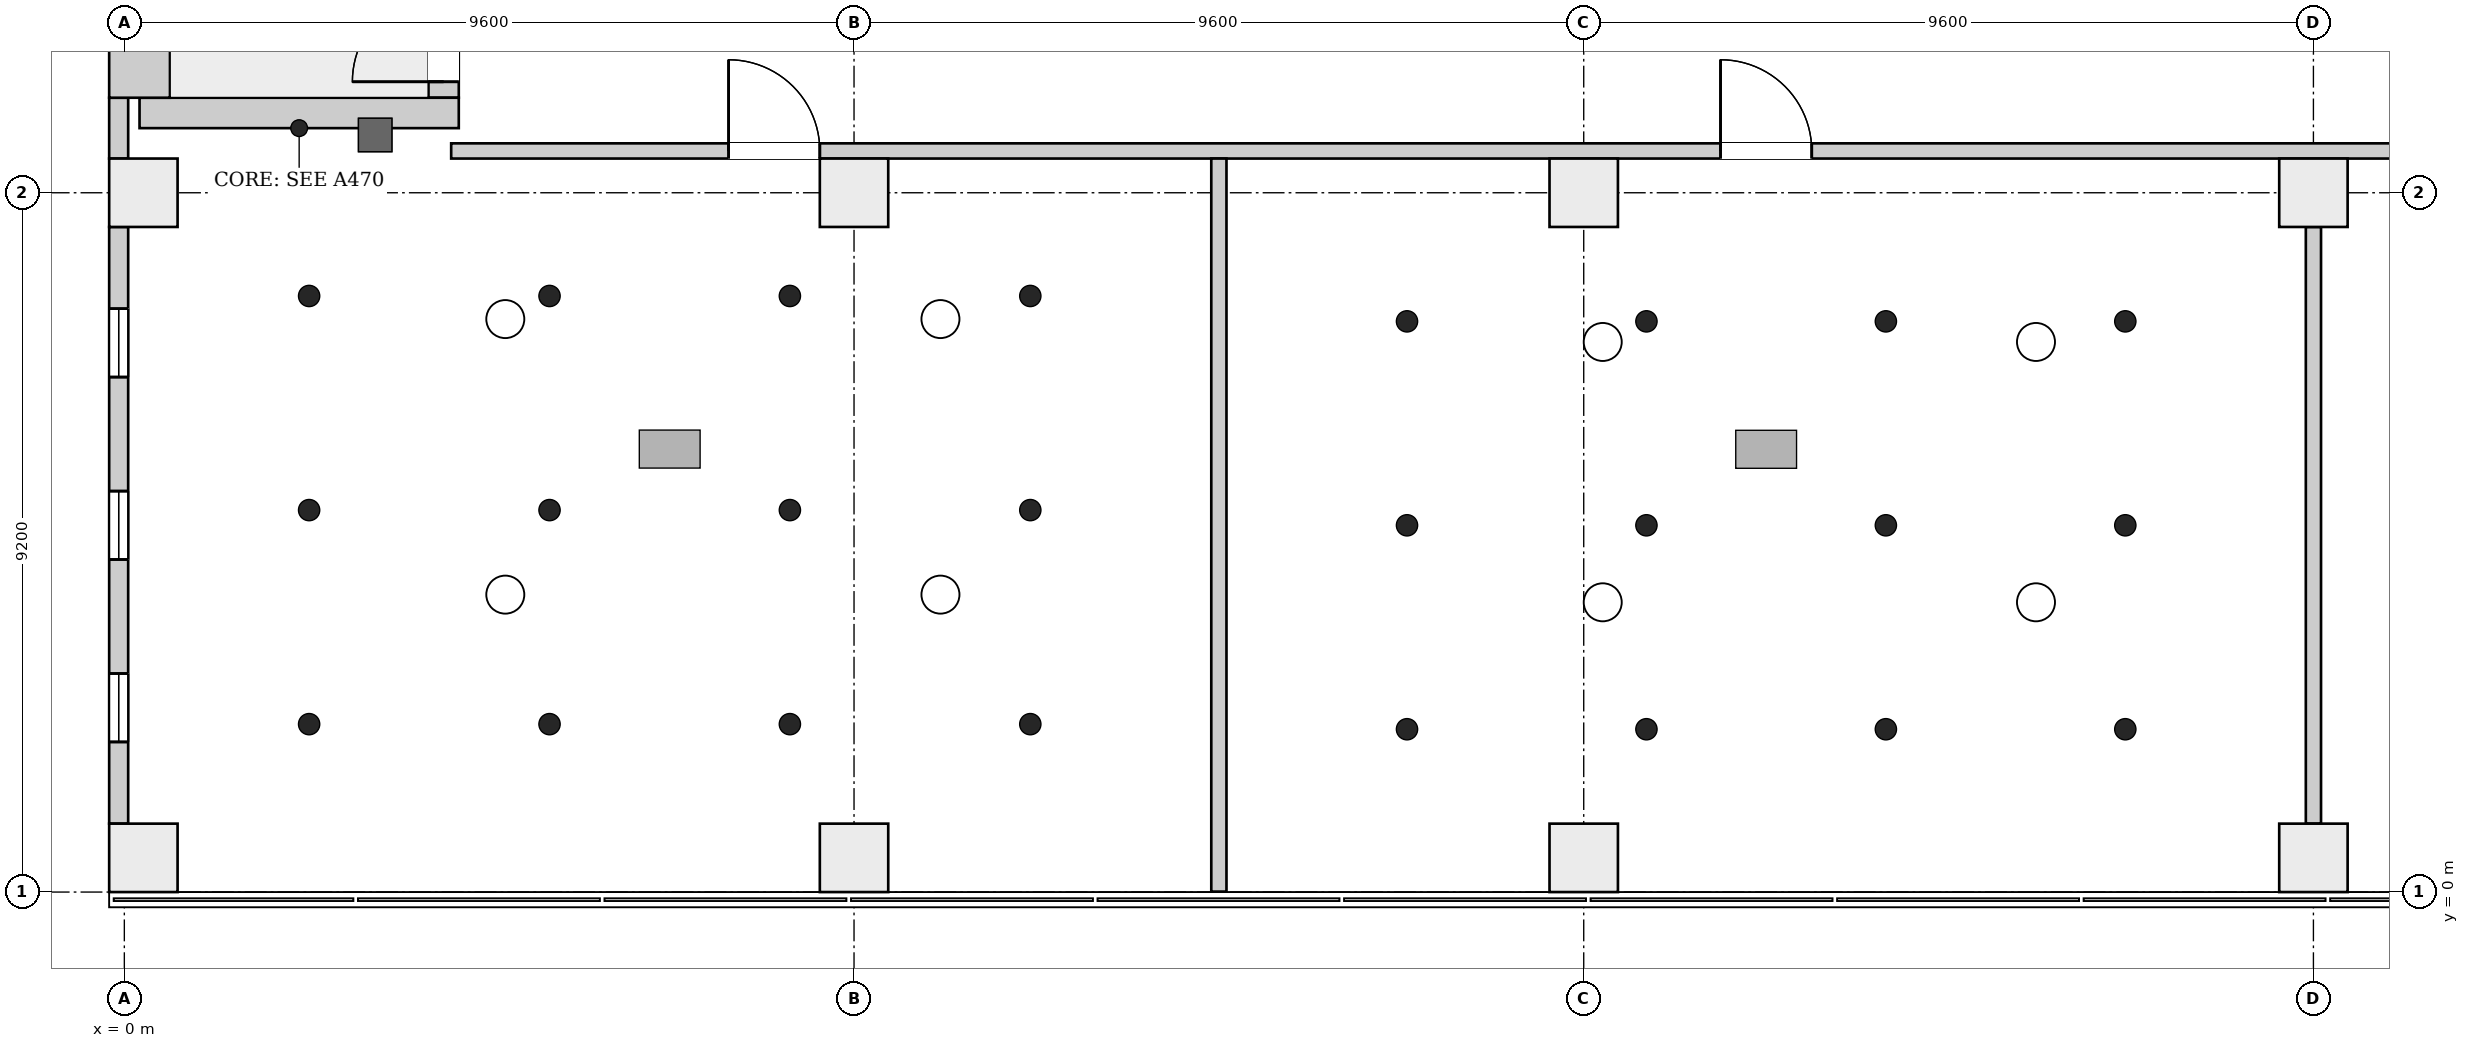
"""IFC4 building model, lengths in metres.
Left out: names, types, materials, properties, quantities, classifications, styles, units other than length and angle.
Written with IfcOpenShell. Run it as: python <this file> out.ifc"""

import sys

from ifc_helpers import new_model, si_unit, direction, frame, frame_2d, origin, origin_2d, place, context, subcontext, project, spatial, rectangle, extrude, element, fill, save


model = new_model("IFC4")
c1 = context("Model", 3, precision=1e-05, world=origin(), true_north=direction((0.0, 1.0)))
c2 = subcontext(c1, "Body", "Model", "MODEL_VIEW")
j1 = project(units=[si_unit("LENGTHUNIT", "METRE"), si_unit("PLANEANGLEUNIT", "RADIAN")], contexts=[c1])
p1 = place(None, origin())
s1 = spatial("IfcSite", under=j1, at=p1, CompositionType="ELEMENT")
p2 = place(p1, origin())
s2 = spatial("IfcBuilding", under=s1, at=p2, CompositionType="ELEMENT")
p3 = place(p2, frame((0.0, 0.0, 40.3)))
s3 = spatial("IfcBuildingStorey", under=s2, at=p3, CompositionType="ELEMENT", Elevation=40.3)
p4 = place(p3, frame((0.2, 10.25, 0.0), z_axis=(0.0, 0.0, 1.0), x_axis=(1.0, 0.0, 0.0)))
e1 = element("IfcWall", 1, at=p4, inside=s3, PredefinedType="SHEAR", context=c2, shape_type="SweptSolid", body=[
    extrude(rectangle(XDim=4.2, YDim=0.4, at=frame_2d((2.1, 0.0))), origin(), (0.0, 0.0, 1.0), 4.2),
])
p5 = place(p3, frame((0.2, 10.45, 0.0), z_axis=(0.0, 0.0, 1.0), x_axis=(0.0, 1.0, 0.0)))
e2 = element("IfcWall", 2, at=p5, inside=s3, PredefinedType="SHEAR", context=c2, shape_type="SweptSolid", body=[
    extrude(rectangle(XDim=6.6, YDim=0.8, at=frame_2d((3.3, 0.0))), origin(), (0.0, 0.0, 1.0), 4.2),
])
p6 = place(p3, frame((4.2, 10.45, 0.0), z_axis=(0.0, 0.0, 1.0), x_axis=(0.0, 1.0, 0.0)))
e3 = element("IfcWall", 3, at=p6, inside=s3, PredefinedType="SHEAR", context=c2, shape_type="SweptSolid", body=[
    extrude(rectangle(XDim=6.6, YDim=0.4, at=frame_2d((3.3, 0.0))), origin(), (0.0, 0.0, 1.0), 4.2),
])
p7 = place(p6, frame((0.21, 0.0, 0.0)))
e4 = element("IfcOpeningElement", 4, at=p7, cuts=e3, PredefinedType="OPENING", context=c2, shape_type="SweptSolid", body=[
    extrude(rectangle(XDim=1.2, YDim=2.1, at=frame_2d((0.6, 1.05))), frame((0.0, 0.21, 0.0), z_axis=(0.0, -1.0, 0.0), x_axis=(1.0, 0.0, 0.0)), (0.0, 0.0, 1.0), 0.42),
])
for number, where, z_axis, x_axis in (
    (5, (0.25, 0.45, 0.0), (0.0, 0.0, 1.0), (1.0, 0.0, 0.0)),
    (6, (9.6, 0.45, 0.0), (0.0, 0.0, 1.0), (1.0, 0.0, 0.0)),
    (7, (19.2, 0.45, 0.0), (0.0, 0.0, 1.0), (1.0, 0.0, 0.0)),
    (8, (28.8, 0.45, 0.0), (0.0, 0.0, 1.0), (1.0, 0.0, 0.0)),
    (9, (0.25, 9.2, 0.0), (0.0, 0.0, 1.0), (1.0, 0.0, 0.0)),
    (10, (9.6, 9.2, 0.0), (0.0, 0.0, 1.0), (1.0, 0.0, 0.0)),
    (11, (19.2, 9.2, 0.0), (0.0, 0.0, 1.0), (1.0, 0.0, 0.0)),
    (12, (28.8, 9.2, 0.0), (0.0, 0.0, 1.0), (1.0, 0.0, 0.0)),
):
    element("IfcColumn", number, at=place(p3, frame(where, z_axis=z_axis, x_axis=x_axis)), inside=s3, PredefinedType="COLUMN", context=c2, shape_type="SweptSolid", body=[
        extrude(rectangle(XDim=0.9, YDim=0.9, at=origin_2d()), origin(), (0.0, 0.0, 1.0), 4.2),
    ])
p8 = place(p3, frame((-0.074, 8.75, 0.0), z_axis=(0.0, 0.0, 1.0), x_axis=(0.0, -1.0, 0.0)))
e13 = element("IfcWall", 13, at=p8, inside=s3, PredefinedType="ELEMENTEDWALL", context=c2, shape_type="SweptSolid", body=[
    extrude(rectangle(XDim=7.85, YDim=0.25, at=frame_2d((3.925, 0.0))), origin(), (0.0, 0.0, 1.0), 3.9),
])
p9 = place(p8, frame((5.875, 0.0, 0.9)))
e14 = element("IfcOpeningElement", 14, at=p9, cuts=e13, PredefinedType="OPENING", context=c2, shape_type="SweptSolid", body=[
    extrude(rectangle(XDim=0.9, YDim=2.6, at=frame_2d((0.45, 1.3))), frame((0.0, 0.135, 0.0), z_axis=(0.0, -1.0, 0.0), x_axis=(1.0, 0.0, 0.0)), (0.0, 0.0, 1.0), 0.27),
])
p10 = place(p8, frame((3.475, 0.0, 0.9)))
e15 = element("IfcOpeningElement", 15, at=p10, cuts=e13, PredefinedType="OPENING", context=c2, shape_type="SweptSolid", body=[
    extrude(rectangle(XDim=0.9, YDim=2.6, at=frame_2d((0.45, 1.3))), frame((0.0, 0.135, 0.0), z_axis=(0.0, -1.0, 0.0), x_axis=(1.0, 0.0, 0.0)), (0.0, 0.0, 1.0), 0.27),
])
p11 = place(p8, frame((1.075, 0.0, 0.9)))
e16 = element("IfcOpeningElement", 16, at=p11, cuts=e13, PredefinedType="OPENING", context=c2, shape_type="SweptSolid", body=[
    extrude(rectangle(XDim=0.9, YDim=2.6, at=frame_2d((0.45, 1.3))), frame((0.0, 0.135, 0.0), z_axis=(0.0, -1.0, 0.0), x_axis=(1.0, 0.0, 0.0)), (0.0, 0.0, 1.0), 0.27),
])
p12 = place(p3, frame((-0.074, 10.45, 0.0), z_axis=(0.0, 0.0, 1.0), x_axis=(0.0, -1.0, 0.0)))
e17 = element("IfcWall", 17, at=p12, inside=s3, PredefinedType="ELEMENTEDWALL", context=c2, shape_type="SweptSolid", body=[
    extrude(rectangle(XDim=0.8, YDim=0.25, at=frame_2d((0.4, 0.0))), origin(), (0.0, 0.0, 1.0), 3.9),
])
p13 = place(p3, frame((4.3, 9.75, 0.0), z_axis=(0.0, 0.0, 1.0), x_axis=(1.0, 0.0, 0.0)))
e18 = element("IfcWall", 18, at=p13, inside=s3, PredefinedType="PARTITIONING", context=c2, shape_type="SweptSolid", body=[
    extrude(rectangle(XDim=43.894, YDim=0.2, at=frame_2d((21.947, 0.0))), origin(), (0.0, 0.0, 1.0), 3.9),
])
p14 = place(p13, frame((3.65, 0.0, 0.0)))
e19 = element("IfcOpeningElement", 19, at=p14, cuts=e18, PredefinedType="OPENING", context=c2, shape_type="SweptSolid", body=[
    extrude(rectangle(XDim=1.2, YDim=2.1, at=frame_2d((0.6, 1.05))), frame((0.0, 0.11, 0.0), z_axis=(0.0, -1.0, 0.0), x_axis=(1.0, 0.0, 0.0)), (0.0, 0.0, 1.0), 0.22),
])
p15 = place(p13, frame((16.7, 0.0, 0.0)))
e20 = element("IfcOpeningElement", 20, at=p15, cuts=e18, PredefinedType="OPENING", context=c2, shape_type="SweptSolid", body=[
    extrude(rectangle(XDim=1.2, YDim=2.1, at=frame_2d((0.6, 1.05))), frame((0.0, 0.11, 0.0), z_axis=(0.0, -1.0, 0.0), x_axis=(1.0, 0.0, 0.0)), (0.0, 0.0, 1.0), 0.22),
])
p16 = place(p13, frame((26.45, 0.0, 0.0)))
e21 = element("IfcOpeningElement", 21, at=p16, cuts=e18, PredefinedType="OPENING", context=c2, shape_type="SweptSolid", body=[
    extrude(rectangle(XDim=0.9, YDim=2.1, at=frame_2d((0.45, 1.05))), frame((0.0, 0.11, 0.0), z_axis=(0.0, -1.0, 0.0), x_axis=(1.0, 0.0, 0.0)), (0.0, 0.0, 1.0), 0.22),
])
p17 = place(p13, frame((36.0, 0.0, 0.0)))
e22 = element("IfcOpeningElement", 22, at=p17, cuts=e18, PredefinedType="OPENING", context=c2, shape_type="SweptSolid", body=[
    extrude(rectangle(XDim=1.2, YDim=2.1, at=frame_2d((0.6, 1.05))), frame((0.0, 0.11, 0.0), z_axis=(0.0, -1.0, 0.0), x_axis=(1.0, 0.0, 0.0)), (0.0, 0.0, 1.0), 0.22),
])
p18 = place(p3, frame((14.4, 0.006, 0.0), z_axis=(0.0, 0.0, 1.0), x_axis=(0.0, 1.0, 0.0)))
e23 = element("IfcWall", 23, at=p18, inside=s3, PredefinedType="PARTITIONING", context=c2, shape_type="SweptSolid", body=[
    extrude(rectangle(XDim=9.644, YDim=0.2, at=frame_2d((4.822, 0.0))), origin(), (0.0, 0.0, 1.0), 3.9),
])
p19 = place(p3, frame((28.8, 0.9, 0.0), z_axis=(0.0, 0.0, 1.0), x_axis=(0.0, 1.0, 0.0)))
e24 = element("IfcWall", 24, at=p19, inside=s3, PredefinedType="PARTITIONING", context=c2, shape_type="SweptSolid", body=[
    extrude(rectangle(XDim=7.85, YDim=0.2, at=frame_2d((3.925, 0.0))), origin(), (0.0, 0.0, 1.0), 3.9),
])
p20 = place(p9, origin())
e25 = element("IfcWindow", 25, at=p20, inside=s3, PartitioningType="SINGLE_PANEL", PredefinedType="WINDOW", context=c2, shape_type="SweptSolid", body=[
    extrude(rectangle(XDim=0.9, YDim=2.6, at=frame_2d((0.45, 1.3))), frame((0.0, 0.03, 0.0), z_axis=(0.0, -1.0, 0.0), x_axis=(1.0, 0.0, 0.0)), (0.0, 0.0, 1.0), 0.06),
])
fill(e14, e25)
p21 = place(p10, origin())
e26 = element("IfcWindow", 26, at=p21, inside=s3, PartitioningType="SINGLE_PANEL", PredefinedType="WINDOW", context=c2, shape_type="SweptSolid", body=[
    extrude(rectangle(XDim=0.9, YDim=2.6, at=frame_2d((0.45, 1.3))), frame((0.0, 0.03, 0.0), z_axis=(0.0, -1.0, 0.0), x_axis=(1.0, 0.0, 0.0)), (0.0, 0.0, 1.0), 0.06),
])
fill(e15, e26)
p22 = place(p11, origin())
e27 = element("IfcWindow", 27, at=p22, inside=s3, PartitioningType="SINGLE_PANEL", PredefinedType="WINDOW", context=c2, shape_type="SweptSolid", body=[
    extrude(rectangle(XDim=0.9, YDim=2.6, at=frame_2d((0.45, 1.3))), frame((0.0, 0.03, 0.0), z_axis=(0.0, -1.0, 0.0), x_axis=(1.0, 0.0, 0.0)), (0.0, 0.0, 1.0), 0.06),
])
fill(e16, e27)
p23 = place(p7, origin())
e28 = element("IfcDoor", 28, at=p23, inside=s3, OperationType="SINGLE_SWING_RIGHT", PredefinedType="DOOR", context=c2, shape_type="SweptSolid", body=[
    extrude(rectangle(XDim=1.2, YDim=2.1, at=frame_2d((0.6, 1.05))), frame((0.0, 0.025, 0.0), z_axis=(0.0, -1.0, 0.0), x_axis=(1.0, 0.0, 0.0)), (0.0, 0.0, 1.0), 0.05),
])
fill(e4, e28)
p24 = place(p14, origin())
e29 = element("IfcDoor", 29, at=p24, inside=s3, OperationType="SINGLE_SWING_RIGHT", PredefinedType="DOOR", context=c2, shape_type="SweptSolid", body=[
    extrude(rectangle(XDim=1.2, YDim=2.1, at=frame_2d((0.6, 1.05))), frame((0.0, 0.025, 0.0), z_axis=(0.0, -1.0, 0.0), x_axis=(1.0, 0.0, 0.0)), (0.0, 0.0, 1.0), 0.05),
])
fill(e19, e29)
p25 = place(p15, origin())
e30 = element("IfcDoor", 30, at=p25, inside=s3, OperationType="SINGLE_SWING_RIGHT", PredefinedType="DOOR", context=c2, shape_type="SweptSolid", body=[
    extrude(rectangle(XDim=1.2, YDim=2.1, at=frame_2d((0.6, 1.05))), frame((0.0, 0.025, 0.0), z_axis=(0.0, -1.0, 0.0), x_axis=(1.0, 0.0, 0.0)), (0.0, 0.0, 1.0), 0.05),
])
fill(e20, e30)
save(model, sys.argv[1])
